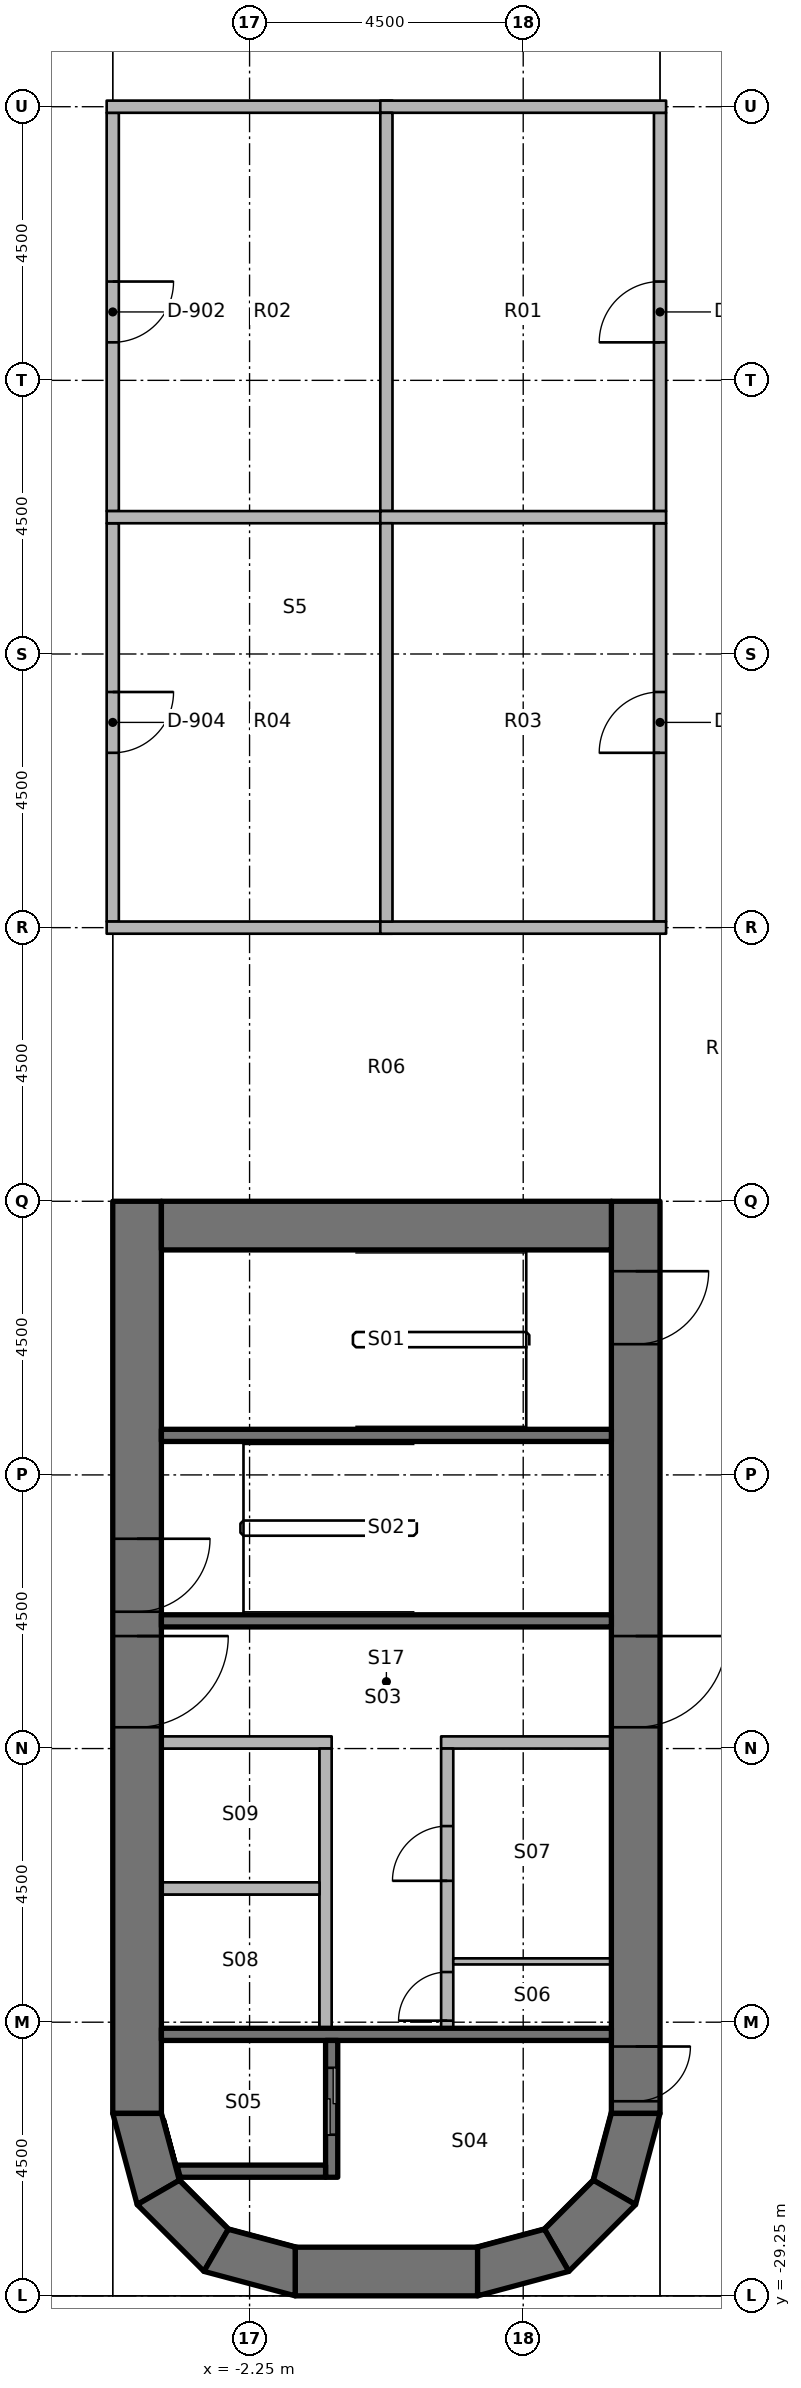
"""IFC4 building model, lengths in metres.
Left out: names, types, materials, properties, quantities, classifications, styles, units other than length and angle.
Written with IfcOpenShell. Run it as: python <this file> out.ifc"""

import sys

from ifc_helpers import new_model, si_unit, direction, frame, frame_2d, origin, place, context, subcontext, project, spatial, polyline, rectangle, outline, extrude, element, fill, save


model = new_model("IFC4")
c1 = context("Model", 3, precision=1e-05, world=origin(), true_north=direction((0.0, 1.0)))
c2 = subcontext(c1, "Body", "Model", "MODEL_VIEW")
j1 = project(units=[si_unit("LENGTHUNIT", "METRE"), si_unit("PLANEANGLEUNIT", "RADIAN")], contexts=[c1])
p1 = place(None, origin())
s1 = spatial("IfcSite", under=j1, at=p1, CompositionType="ELEMENT")
p2 = place(p1, origin())
s2 = spatial("IfcBuilding", under=s1, at=p2, CompositionType="ELEMENT")
p3 = place(p2, frame((0.0, 0.0, 109.4)))
s3 = spatial("IfcBuildingStorey", under=s2, at=p3, CompositionType="ELEMENT", Elevation=109.4)
p4 = place(p3, frame((-4.1, -11.25, 0.0), z_axis=(0.0, 0.0, 1.0), x_axis=(0.0, -1.0, 0.0)))
e1 = element("IfcWall", 1, at=p4, inside=s3, PredefinedType="SHEAR", context=c2, shape_type="SweptSolid", body=[
    extrude(rectangle(XDim=15.0, YDim=0.8, at=frame_2d((7.5, 0.0))), origin(), (0.0, 0.0, 1.0), 3.8),
])
p5 = place(p4, frame((7.15, 0.0, 0.0)))
e2 = element("IfcOpeningElement", 2, at=p5, cuts=e1, PredefinedType="OPENING", context=c2, shape_type="SweptSolid", body=[
    extrude(rectangle(XDim=1.5, YDim=2.3, at=frame_2d((0.75, 1.15))), frame((0.0, 0.41, 0.0), z_axis=(0.0, -1.0, 0.0), x_axis=(1.0, 0.0, 0.0)), (0.0, 0.0, 1.0), 0.82),
])
p6 = place(p4, frame((5.55, 0.0, 0.0)))
e3 = element("IfcOpeningElement", 3, at=p6, cuts=e1, PredefinedType="OPENING", context=c2, shape_type="SweptSolid", body=[
    extrude(rectangle(XDim=1.2, YDim=2.1, at=frame_2d((0.6, 1.05))), frame((0.0, 0.41, 0.0), z_axis=(0.0, -1.0, 0.0), x_axis=(1.0, 0.0, 0.0)), (0.0, 0.0, 1.0), 0.82),
])
p7 = place(p3, frame((4.1, -11.25, 0.0), z_axis=(0.0, 0.0, 1.0), x_axis=(0.0, -1.0, 0.0)))
e4 = element("IfcWall", 4, at=p7, inside=s3, PredefinedType="SHEAR", context=c2, shape_type="SweptSolid", body=[
    extrude(rectangle(XDim=15.0, YDim=0.8, at=frame_2d((7.5, 0.0))), origin(), (0.0, 0.0, 1.0), 3.8),
])
p8 = place(p7, frame((7.15, 0.0, 0.0)))
e5 = element("IfcOpeningElement", 5, at=p8, cuts=e4, PredefinedType="OPENING", context=c2, shape_type="SweptSolid", body=[
    extrude(rectangle(XDim=1.5, YDim=2.3, at=frame_2d((0.75, 1.15))), frame((0.0, 0.41, 0.0), z_axis=(0.0, -1.0, 0.0), x_axis=(1.0, 0.0, 0.0)), (0.0, 0.0, 1.0), 0.82),
])
p9 = place(p7, frame((13.9, 0.0, 0.0)))
e6 = element("IfcOpeningElement", 6, at=p9, cuts=e4, PredefinedType="OPENING", context=c2, shape_type="SweptSolid", body=[
    extrude(rectangle(XDim=0.9, YDim=2.1, at=frame_2d((0.45, 1.05))), frame((0.0, 0.41, 0.0), z_axis=(0.0, -1.0, 0.0), x_axis=(1.0, 0.0, 0.0)), (0.0, 0.0, 1.0), 0.82),
])
p10 = place(p7, frame((1.15, 0.0, 0.0)))
e7 = element("IfcOpeningElement", 7, at=p10, cuts=e4, PredefinedType="OPENING", context=c2, shape_type="SweptSolid", body=[
    extrude(rectangle(XDim=1.2, YDim=2.1, at=frame_2d((0.6, 1.05))), frame((0.0, 0.41, 0.0), z_axis=(0.0, -1.0, 0.0), x_axis=(1.0, 0.0, 0.0)), (0.0, 0.0, 1.0), 0.82),
])
p11 = place(p3, frame((-3.7, -11.65, 0.0), z_axis=(0.0, 0.0, 1.0), x_axis=(1.0, 0.0, 0.0)))
e8 = element("IfcWall", 8, at=p11, inside=s3, PredefinedType="SHEAR", context=c2, shape_type="SweptSolid", body=[
    extrude(rectangle(XDim=7.4, YDim=0.8, at=frame_2d((3.7, 0.0))), origin(), (0.0, 0.0, 1.0), 3.8),
])
p12 = place(p3, frame((-1.5, -28.85, 0.0), z_axis=(0.0, 0.0, 1.0), x_axis=(1.0, 0.0, 0.0)))
e9 = element("IfcWall", 9, at=p12, inside=s3, PredefinedType="SHEAR", context=c2, shape_type="SweptSolid", body=[
    extrude(rectangle(XDim=3.0, YDim=0.8, at=frame_2d((1.5, 0.0))), origin(), (0.0, 0.0, 1.0), 3.8),
])
p13 = place(p3, origin())
e10 = element("IfcWall", 10, at=p13, inside=s3, PredefinedType="SHEAR", context=c2, shape_type="SweptSolid", body=[
    extrude(outline(polyline([(-4.5, -26.25), (-4.098, -27.75), (-3.405, -27.35), (-3.7, -26.25), (-4.5, -26.25)])), origin(), (0.0, 0.0, 1.0), 3.8),
])
p14 = place(p3, origin())
e11 = element("IfcWall", 11, at=p14, inside=s3, PredefinedType="SHEAR", context=c2, shape_type="SweptSolid", body=[
    extrude(outline(polyline([(-4.098, -27.75), (-3.0, -28.848), (-2.6, -28.155), (-3.405, -27.35), (-4.098, -27.75)])), origin(), (0.0, 0.0, 1.0), 3.8),
])
p15 = place(p3, origin())
e12 = element("IfcWall", 12, at=p15, inside=s3, PredefinedType="SHEAR", context=c2, shape_type="SweptSolid", body=[
    extrude(outline(polyline([(-3.0, -28.848), (-1.5, -29.25), (-1.5, -28.45), (-2.6, -28.155), (-3.0, -28.848)])), origin(), (0.0, 0.0, 1.0), 3.8),
])
p16 = place(p3, origin())
e13 = element("IfcWall", 13, at=p16, inside=s3, PredefinedType="SHEAR", context=c2, shape_type="SweptSolid", body=[
    extrude(outline(polyline([(4.5, -26.25), (4.098, -27.75), (3.405, -27.35), (3.7, -26.25), (4.5, -26.25)])), origin(), (0.0, 0.0, 1.0), 3.8),
])
p17 = place(p3, origin())
e14 = element("IfcWall", 14, at=p17, inside=s3, PredefinedType="SHEAR", context=c2, shape_type="SweptSolid", body=[
    extrude(outline(polyline([(4.098, -27.75), (3.0, -28.848), (2.6, -28.155), (3.405, -27.35), (4.098, -27.75)])), origin(), (0.0, 0.0, 1.0), 3.8),
])
p18 = place(p3, origin())
e15 = element("IfcWall", 15, at=p18, inside=s3, PredefinedType="SHEAR", context=c2, shape_type="SweptSolid", body=[
    extrude(outline(polyline([(3.0, -28.848), (1.5, -29.25), (1.5, -28.45), (2.6, -28.155), (3.0, -28.848)])), origin(), (0.0, 0.0, 1.0), 3.8),
])
p19 = place(p3, frame((3.7, -24.95, 0.0), z_axis=(0.0, 0.0, 1.0), x_axis=(-1.0, 0.0, 0.0)))
e16 = element("IfcWall", 16, at=p19, inside=s3, PredefinedType="SHEAR", context=c2, shape_type="SweptSolid", body=[
    extrude(rectangle(XDim=7.4, YDim=0.2, at=frame_2d((3.7, 0.0))), origin(), (0.0, 0.0, 1.0), 3.65),
])
p20 = place(p3, frame((-0.9, -27.3, 0.0), z_axis=(0.0, 0.0, 1.0), x_axis=(0.0, 1.0, 0.0)))
e17 = element("IfcWall", 17, at=p20, inside=s3, PredefinedType="SHEAR", context=c2, shape_type="SweptSolid", body=[
    extrude(rectangle(XDim=2.25, YDim=0.2, at=frame_2d((1.125, 0.0))), origin(), (0.0, 0.0, 1.0), 3.65),
])
p21 = place(p20, frame((0.7, 0.0, 0.0)))
e18 = element("IfcOpeningElement", 18, at=p21, cuts=e17, PredefinedType="OPENING", context=c2, shape_type="SweptSolid", body=[
    extrude(rectangle(XDim=1.1, YDim=2.3, at=frame_2d((0.55, 1.15))), frame((0.0, 0.11, 0.0), z_axis=(0.0, -1.0, 0.0), x_axis=(1.0, 0.0, 0.0)), (0.0, 0.0, 1.0), 0.22),
])
p22 = place(p3, origin())
e19 = element("IfcWall", 19, at=p22, inside=s3, PredefinedType="SHEAR", context=c2, shape_type="SweptSolid", body=[
    extrude(outline(polyline([(-1.0, -27.1), (-3.444, -27.1), (-3.39, -27.3), (-1.0, -27.3), (-1.0, -27.1)])), origin(), (0.0, 0.0, 1.0), 3.65),
])
for number, where, z_axis, x_axis in (
    (20, (3.7, -18.15, 0.0), (0.0, 0.0, 1.0), (-1.0, 0.0, 0.0)),
    (21, (3.7, -15.1, 0.0), (0.0, 0.0, 1.0), (-1.0, 0.0, 0.0)),
):
    element("IfcWall", number, at=place(p3, frame(where, z_axis=z_axis, x_axis=x_axis)), inside=s3, PredefinedType="SHEAR", context=c2, shape_type="SweptSolid", body=[
        extrude(rectangle(XDim=7.4, YDim=0.2, at=frame_2d((3.7, 0.0))), origin(), (0.0, 0.0, 1.0), 3.65),
    ])
p23 = place(p3, frame((3.7, -20.15, 0.0), z_axis=(0.0, 0.0, 1.0), x_axis=(-1.0, 0.0, 0.0)))
e22 = element("IfcWall", 22, at=p23, inside=s3, PredefinedType="PARTITIONING", context=c2, shape_type="SweptSolid", body=[
    extrude(rectangle(XDim=2.8, YDim=0.2, at=frame_2d((1.4, 0.0))), origin(), (0.0, 0.0, 1.0), 3.65),
])
p24 = place(p3, frame((1.0, -24.85, 0.0), z_axis=(0.0, 0.0, 1.0), x_axis=(0.0, 1.0, 0.0)))
e23 = element("IfcWall", 23, at=p24, inside=s3, PredefinedType="PARTITIONING", context=c2, shape_type="SweptSolid", body=[
    extrude(rectangle(XDim=4.6, YDim=0.2, at=frame_2d((2.3, 0.0))), origin(), (0.0, 0.0, 1.0), 3.65),
])
p25 = place(p24, frame((0.125, 0.0, 0.0)))
e24 = element("IfcOpeningElement", 24, at=p25, cuts=e23, PredefinedType="OPENING", context=c2, shape_type="SweptSolid", body=[
    extrude(rectangle(XDim=0.8, YDim=2.1, at=frame_2d((0.4, 1.05))), frame((0.0, 0.11, 0.0), z_axis=(0.0, -1.0, 0.0), x_axis=(1.0, 0.0, 0.0)), (0.0, 0.0, 1.0), 0.22),
])
p26 = place(p24, frame((2.425, 0.0, 0.0)))
e25 = element("IfcOpeningElement", 25, at=p26, cuts=e23, PredefinedType="OPENING", context=c2, shape_type="SweptSolid", body=[
    extrude(rectangle(XDim=0.9, YDim=2.1, at=frame_2d((0.45, 1.05))), frame((0.0, 0.11, 0.0), z_axis=(0.0, -1.0, 0.0), x_axis=(1.0, 0.0, 0.0)), (0.0, 0.0, 1.0), 0.22),
])
p27 = place(p3, frame((-0.9, -20.15, 0.0), z_axis=(0.0, 0.0, 1.0), x_axis=(-1.0, 0.0, 0.0)))
e26 = element("IfcWall", 26, at=p27, inside=s3, PredefinedType="PARTITIONING", context=c2, shape_type="SweptSolid", body=[
    extrude(rectangle(XDim=2.8, YDim=0.2, at=frame_2d((1.4, 0.0))), origin(), (0.0, 0.0, 1.0), 3.65),
])
p28 = place(p3, frame((-1.0, -24.85, 0.0), z_axis=(0.0, 0.0, 1.0), x_axis=(0.0, 1.0, 0.0)))
e27 = element("IfcWall", 27, at=p28, inside=s3, PredefinedType="PARTITIONING", context=c2, shape_type="SweptSolid", body=[
    extrude(rectangle(XDim=4.6, YDim=0.2, at=frame_2d((2.3, 0.0))), origin(), (0.0, 0.0, 1.0), 3.65),
])
p29 = place(p3, frame((3.7, -23.75, 0.0), z_axis=(0.0, 0.0, 1.0), x_axis=(-1.0, 0.0, 0.0)))
e28 = element("IfcWall", 28, at=p29, inside=s3, PredefinedType="PARTITIONING", context=c2, shape_type="SweptSolid", body=[
    extrude(rectangle(XDim=2.6, YDim=0.1, at=frame_2d((1.3, 0.0))), origin(), (0.0, 0.0, 1.0), 3.65),
])
p30 = place(p3, frame((-1.1, -22.55, 0.0), z_axis=(0.0, 0.0, 1.0), x_axis=(-1.0, 0.0, 0.0)))
e29 = element("IfcWall", 29, at=p30, inside=s3, PredefinedType="PARTITIONING", context=c2, shape_type="SweptSolid", body=[
    extrude(rectangle(XDim=2.6, YDim=0.2, at=frame_2d((1.3, 0.0))), origin(), (0.0, 0.0, 1.0), 3.65),
])
p31 = place(p3, frame((-4.5, 6.65, 0.0), z_axis=(0.0, 0.0, 1.0), x_axis=(0.0, -1.0, 0.0)))
e30 = element("IfcWall", 30, at=p31, inside=s3, PredefinedType="PARTITIONING", context=c2, shape_type="SweptSolid", body=[
    extrude(rectangle(XDim=6.55, YDim=0.2, at=frame_2d((3.275, 0.0))), origin(), (0.0, 0.0, 1.0), 2.738),
])
p32 = place(p31, frame((2.775, 0.0, 0.0)))
e31 = element("IfcOpeningElement", 31, at=p32, cuts=e30, PredefinedType="OPENING", context=c2, shape_type="SweptSolid", body=[
    extrude(rectangle(XDim=1.0, YDim=2.1, at=frame_2d((0.5, 1.05))), frame((0.0, 0.11, 0.0), z_axis=(0.0, -1.0, 0.0), x_axis=(1.0, 0.0, 0.0)), (0.0, 0.0, 1.0), 0.22),
])
p33 = place(p3, frame((-4.5, -0.1, 0.0), z_axis=(0.0, 0.0, 1.0), x_axis=(0.0, -1.0, 0.0)))
e32 = element("IfcWall", 32, at=p33, inside=s3, PredefinedType="PARTITIONING", context=c2, shape_type="SweptSolid", body=[
    extrude(rectangle(XDim=6.55, YDim=0.2, at=frame_2d((3.275, 0.0))), origin(), (0.0, 0.0, 1.0), 2.738),
])
p34 = place(p33, frame((2.775, 0.0, 0.0)))
e33 = element("IfcOpeningElement", 33, at=p34, cuts=e32, PredefinedType="OPENING", context=c2, shape_type="SweptSolid", body=[
    extrude(rectangle(XDim=1.0, YDim=2.1, at=frame_2d((0.5, 1.05))), frame((0.0, 0.11, 0.0), z_axis=(0.0, -1.0, 0.0), x_axis=(1.0, 0.0, 0.0)), (0.0, 0.0, 1.0), 0.22),
])
p35 = place(p3, frame((4.5, 0.1, 0.0), z_axis=(0.0, 0.0, 1.0), x_axis=(0.0, 1.0, 0.0)))
e34 = element("IfcWall", 34, at=p35, inside=s3, PredefinedType="PARTITIONING", context=c2, shape_type="SweptSolid", body=[
    extrude(rectangle(XDim=6.55, YDim=0.2, at=frame_2d((3.275, 0.0))), origin(), (0.0, 0.0, 1.0), 2.738),
])
p36 = place(p35, frame((2.775, 0.0, 0.0)))
e35 = element("IfcOpeningElement", 35, at=p36, cuts=e34, PredefinedType="OPENING", context=c2, shape_type="SweptSolid", body=[
    extrude(rectangle(XDim=1.0, YDim=2.1, at=frame_2d((0.5, 1.05))), frame((0.0, 0.11, 0.0), z_axis=(0.0, -1.0, 0.0), x_axis=(1.0, 0.0, 0.0)), (0.0, 0.0, 1.0), 0.22),
])
p37 = place(p3, frame((4.5, -6.65, 0.0), z_axis=(0.0, 0.0, 1.0), x_axis=(0.0, 1.0, 0.0)))
e36 = element("IfcWall", 36, at=p37, inside=s3, PredefinedType="PARTITIONING", context=c2, shape_type="SweptSolid", body=[
    extrude(rectangle(XDim=6.55, YDim=0.2, at=frame_2d((3.275, 0.0))), origin(), (0.0, 0.0, 1.0), 2.738),
])
p38 = place(p37, frame((2.775, 0.0, 0.0)))
e37 = element("IfcOpeningElement", 37, at=p38, cuts=e36, PredefinedType="OPENING", context=c2, shape_type="SweptSolid", body=[
    extrude(rectangle(XDim=1.0, YDim=2.1, at=frame_2d((0.5, 1.05))), frame((0.0, 0.11, 0.0), z_axis=(0.0, -1.0, 0.0), x_axis=(1.0, 0.0, 0.0)), (0.0, 0.0, 1.0), 0.22),
])
for number, where, z_axis, x_axis in (
    (38, (-4.6, 6.75, 0.0), (0.0, 0.0, 1.0), (1.0, 0.0, 0.0)),
    (39, (-0.1, 6.75, 0.0), (0.0, 0.0, 1.0), (1.0, 0.0, 0.0)),
    (40, (-4.6, -6.75, 0.0), (0.0, 0.0, 1.0), (1.0, 0.0, 0.0)),
    (41, (-0.1, -6.75, 0.0), (0.0, 0.0, 1.0), (1.0, 0.0, 0.0)),
):
    element("IfcWall", number, at=place(p3, frame(where, z_axis=z_axis, x_axis=x_axis)), inside=s3, PredefinedType="PARTITIONING", context=c2, shape_type="SweptSolid", body=[
        extrude(rectangle(XDim=4.7, YDim=0.2, at=frame_2d((2.35, 0.0))), origin(), (0.0, 0.0, 1.0), 2.738),
    ])
p39 = place(p3, frame((0.0, 0.1, 0.0), z_axis=(0.0, 0.0, 1.0), x_axis=(0.0, 1.0, 0.0)))
e42 = element("IfcWall", 42, at=p39, inside=s3, PredefinedType="PARTITIONING", context=c2, shape_type="SweptSolid", body=[
    extrude(rectangle(XDim=6.55, YDim=0.2, at=frame_2d((3.275, 0.0))), origin(), (0.0, 0.0, 1.0), 2.738),
])
for number, where, z_axis, x_axis in (
    (43, (-4.6, 0.0, 0.0), (0.0, 0.0, 1.0), (1.0, 0.0, 0.0)),
    (44, (-0.1, 0.0, 0.0), (0.0, 0.0, 1.0), (1.0, 0.0, 0.0)),
):
    element("IfcWall", number, at=place(p3, frame(where, z_axis=z_axis, x_axis=x_axis)), inside=s3, PredefinedType="PARTITIONING", context=c2, shape_type="SweptSolid", body=[
        extrude(rectangle(XDim=4.7, YDim=0.2, at=frame_2d((2.35, 0.0))), origin(), (0.0, 0.0, 1.0), 2.738),
    ])
p40 = place(p3, frame((0.0, -6.65, 0.0), z_axis=(0.0, 0.0, 1.0), x_axis=(0.0, 1.0, 0.0)))
e45 = element("IfcWall", 45, at=p40, inside=s3, PredefinedType="PARTITIONING", context=c2, shape_type="SweptSolid", body=[
    extrude(rectangle(XDim=6.55, YDim=0.2, at=frame_2d((3.275, 0.0))), origin(), (0.0, 0.0, 1.0), 2.738),
])
p41 = place(p8, origin())
e46 = element("IfcDoor", 46, at=p41, inside=s3, OperationType="DOUBLE_DOOR_SINGLE_SWING", PredefinedType="DOOR", context=c2, shape_type="SweptSolid", body=[
    extrude(rectangle(XDim=1.5, YDim=2.3, at=frame_2d((0.75, 1.15))), frame((0.0, 0.025, 0.0), z_axis=(0.0, -1.0, 0.0), x_axis=(1.0, 0.0, 0.0)), (0.0, 0.0, 1.0), 0.05),
])
fill(e5, e46)
p42 = place(p5, origin())
e47 = element("IfcDoor", 47, at=p42, inside=s3, OperationType="DOUBLE_DOOR_SINGLE_SWING", PredefinedType="DOOR", context=c2, shape_type="SweptSolid", body=[
    extrude(rectangle(XDim=1.5, YDim=2.3, at=frame_2d((0.75, 1.15))), frame((0.0, 0.025, 0.0), z_axis=(0.0, -1.0, 0.0), x_axis=(1.0, 0.0, 0.0)), (0.0, 0.0, 1.0), 0.05),
])
fill(e2, e47)
p43 = place(p9, origin())
e48 = element("IfcDoor", 48, at=p43, inside=s3, OperationType="SINGLE_SWING_LEFT", PredefinedType="DOOR", context=c2, shape_type="SweptSolid", body=[
    extrude(rectangle(XDim=0.9, YDim=2.1, at=frame_2d((0.45, 1.05))), frame((0.0, 0.025, 0.0), z_axis=(0.0, -1.0, 0.0), x_axis=(1.0, 0.0, 0.0)), (0.0, 0.0, 1.0), 0.05),
])
fill(e6, e48)
p44 = place(p6, origin())
e49 = element("IfcDoor", 49, at=p44, inside=s3, OperationType="SINGLE_SWING_RIGHT", PredefinedType="DOOR", context=c2, shape_type="SweptSolid", body=[
    extrude(rectangle(XDim=1.2, YDim=2.1, at=frame_2d((0.6, 1.05))), frame((0.0, 0.025, 0.0), z_axis=(0.0, -1.0, 0.0), x_axis=(1.0, 0.0, 0.0)), (0.0, 0.0, 1.0), 0.05),
])
fill(e3, e49)
p45 = place(p10, origin())
e50 = element("IfcDoor", 50, at=p45, inside=s3, OperationType="SINGLE_SWING_RIGHT", PredefinedType="DOOR", context=c2, shape_type="SweptSolid", body=[
    extrude(rectangle(XDim=1.2, YDim=2.1, at=frame_2d((0.6, 1.05))), frame((0.0, 0.025, 0.0), z_axis=(0.0, -1.0, 0.0), x_axis=(1.0, 0.0, 0.0)), (0.0, 0.0, 1.0), 0.05),
])
fill(e7, e50)
p46 = place(p21, origin())
e51 = element("IfcDoor", 51, at=p46, inside=s3, OperationType="DOUBLE_DOOR_SLIDING", PredefinedType="DOOR", context=c2, shape_type="SweptSolid", body=[
    extrude(rectangle(XDim=1.1, YDim=2.3, at=frame_2d((0.55, 1.15))), frame((0.0, 0.025, 0.0), z_axis=(0.0, -1.0, 0.0), x_axis=(1.0, 0.0, 0.0)), (0.0, 0.0, 1.0), 0.05),
])
fill(e18, e51)
p47 = place(p25, origin())
e52 = element("IfcDoor", 52, at=p47, inside=s3, OperationType="SINGLE_SWING_LEFT", PredefinedType="DOOR", context=c2, shape_type="SweptSolid", body=[
    extrude(rectangle(XDim=0.8, YDim=2.1, at=frame_2d((0.4, 1.05))), frame((0.0, 0.025, 0.0), z_axis=(0.0, -1.0, 0.0), x_axis=(1.0, 0.0, 0.0)), (0.0, 0.0, 1.0), 0.05),
])
fill(e24, e52)
p48 = place(p26, origin())
e53 = element("IfcDoor", 53, at=p48, inside=s3, OperationType="SINGLE_SWING_RIGHT", PredefinedType="DOOR", context=c2, shape_type="SweptSolid", body=[
    extrude(rectangle(XDim=0.9, YDim=2.1, at=frame_2d((0.45, 1.05))), frame((0.0, 0.025, 0.0), z_axis=(0.0, -1.0, 0.0), x_axis=(1.0, 0.0, 0.0)), (0.0, 0.0, 1.0), 0.05),
])
fill(e25, e53)
p49 = place(p36, origin())
e54 = element("IfcDoor", 54, at=p49, inside=s3, OperationType="SINGLE_SWING_LEFT", PredefinedType="DOOR", context=c2, shape_type="SweptSolid", body=[
    extrude(rectangle(XDim=1.0, YDim=2.1, at=frame_2d((0.5, 1.05))), frame((0.0, 0.025, 0.0), z_axis=(0.0, -1.0, 0.0), x_axis=(1.0, 0.0, 0.0)), (0.0, 0.0, 1.0), 0.05),
])
fill(e35, e54)
p50 = place(p32, origin())
e55 = element("IfcDoor", 55, at=p50, inside=s3, OperationType="SINGLE_SWING_RIGHT", PredefinedType="DOOR", context=c2, shape_type="SweptSolid", body=[
    extrude(rectangle(XDim=1.0, YDim=2.1, at=frame_2d((0.5, 1.05))), frame((0.0, 0.025, 0.0), z_axis=(0.0, -1.0, 0.0), x_axis=(1.0, 0.0, 0.0)), (0.0, 0.0, 1.0), 0.05),
])
fill(e31, e55)
p51 = place(p38, origin())
e56 = element("IfcDoor", 56, at=p51, inside=s3, OperationType="SINGLE_SWING_RIGHT", PredefinedType="DOOR", context=c2, shape_type="SweptSolid", body=[
    extrude(rectangle(XDim=1.0, YDim=2.1, at=frame_2d((0.5, 1.05))), frame((0.0, 0.025, 0.0), z_axis=(0.0, -1.0, 0.0), x_axis=(1.0, 0.0, 0.0)), (0.0, 0.0, 1.0), 0.05),
])
fill(e37, e56)
p52 = place(p34, origin())
e57 = element("IfcDoor", 57, at=p52, inside=s3, OperationType="SINGLE_SWING_LEFT", PredefinedType="DOOR", context=c2, shape_type="SweptSolid", body=[
    extrude(rectangle(XDim=1.0, YDim=2.1, at=frame_2d((0.5, 1.05))), frame((0.0, 0.025, 0.0), z_axis=(0.0, -1.0, 0.0), x_axis=(1.0, 0.0, 0.0)), (0.0, 0.0, 1.0), 0.05),
])
fill(e33, e57)
save(model, sys.argv[1])
